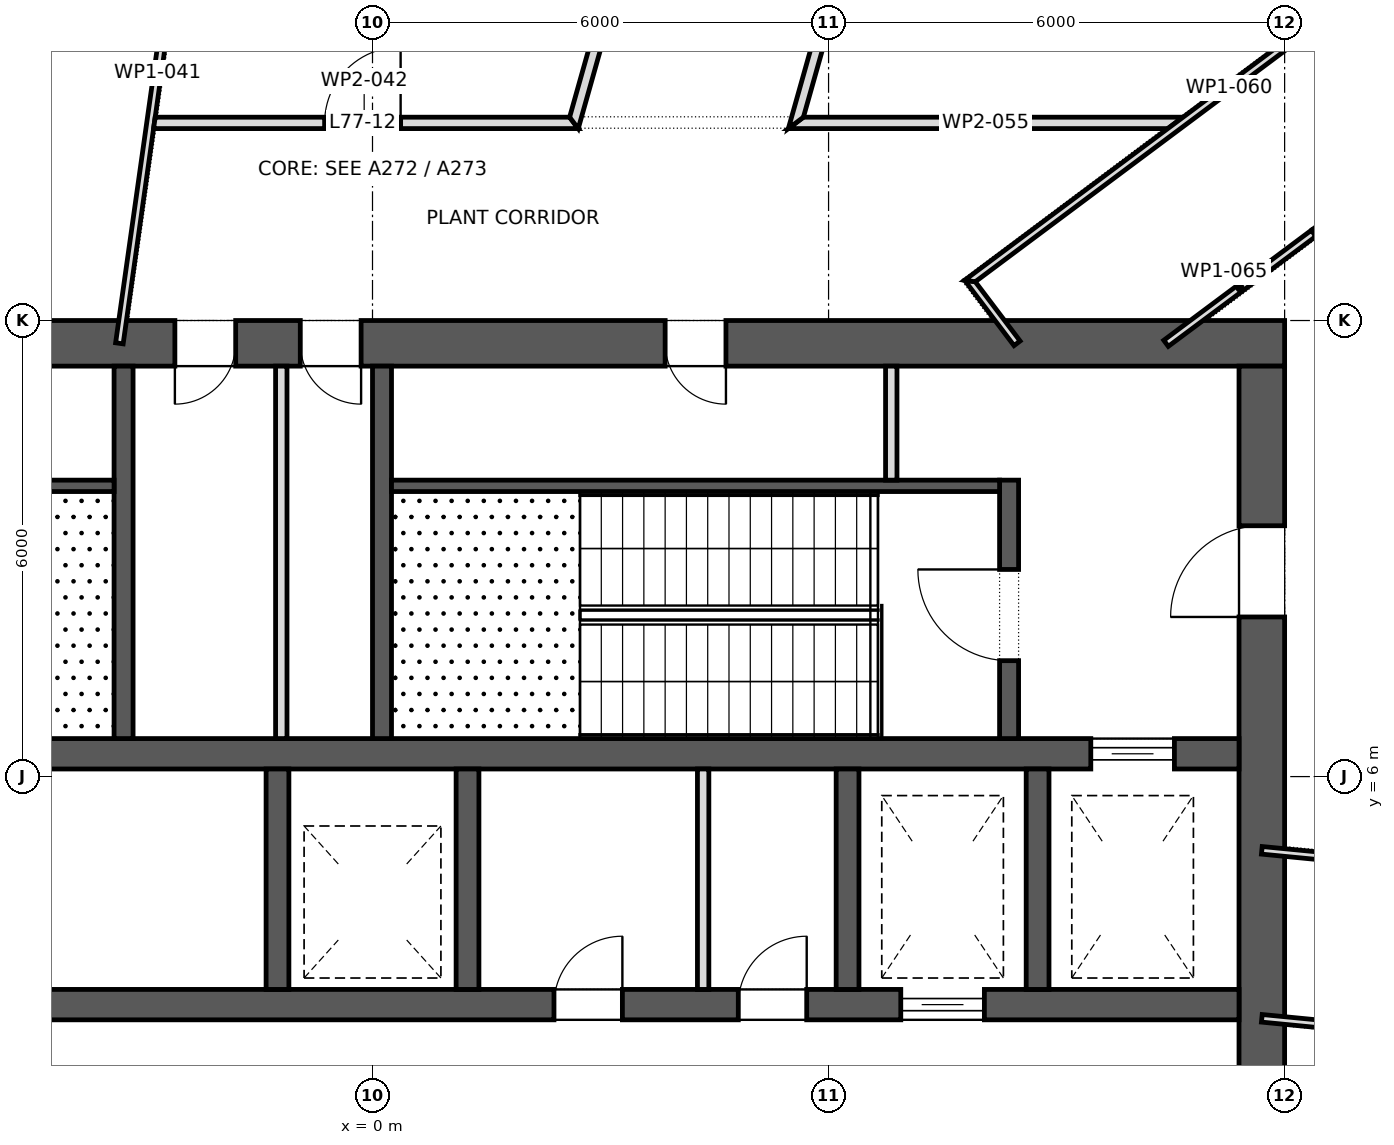
"""IFC4 building model, lengths in metres.
Left out: names, types, materials, properties, quantities, classifications, styles, units other than length and angle.
Written with IfcOpenShell. Run it as: python <this file> out.ifc"""

import sys

from ifc_helpers import new_model, si_unit, direction, frame, frame_2d, origin, place, context, subcontext, project, spatial, polyline, rectangle, outline, extrude, element, fill, save


model = new_model("IFC4")
c1 = context("Model", 3, precision=1e-05, world=origin(), true_north=direction((0.0, 1.0)))
c2 = subcontext(c1, "Body", "Model", "MODEL_VIEW")
j1 = project(units=[si_unit("LENGTHUNIT", "METRE"), si_unit("PLANEANGLEUNIT", "RADIAN")], contexts=[c1])
p1 = place(None, origin())
s1 = spatial("IfcSite", under=j1, at=p1, CompositionType="ELEMENT")
p2 = place(p1, origin())
s2 = spatial("IfcBuilding", under=s1, at=p2, CompositionType="ELEMENT")
p3 = place(p2, frame((0.0, 0.0, 328.3)))
s3 = spatial("IfcBuildingStorey", under=s2, at=p3, CompositionType="ELEMENT", Elevation=328.3)
p4 = place(p3, frame((-12.0, 11.7, 0.0), z_axis=(0.0, 0.0, 1.0), x_axis=(1.0, 0.0, 0.0)))
e1 = element("IfcWall", 1, at=p4, inside=s3, PredefinedType="SHEAR", context=c2, shape_type="SweptSolid", body=[
    extrude(rectangle(XDim=24.0, YDim=0.6, at=frame_2d((12.0, 0.0))), origin(), (0.0, 0.0, 1.0), 5.0),
])
p5 = place(p4, frame((9.4, 0.0, 0.0)))
e2 = element("IfcOpeningElement", 2, at=p5, cuts=e1, PredefinedType="OPENING", context=c2, shape_type="SweptSolid", body=[
    extrude(rectangle(XDim=0.8, YDim=2.1, at=frame_2d((0.4, 1.05))), frame((0.0, 0.312, 0.0), z_axis=(0.0, -1.0, 0.0), x_axis=(1.0, 0.0, 0.0)), (0.0, 0.0, 1.0), 0.624),
])
p6 = place(p4, frame((11.05, 0.0, 0.0)))
e3 = element("IfcOpeningElement", 3, at=p6, cuts=e1, PredefinedType="OPENING", context=c2, shape_type="SweptSolid", body=[
    extrude(rectangle(XDim=0.8, YDim=2.1, at=frame_2d((0.4, 1.05))), frame((0.0, 0.312, 0.0), z_axis=(0.0, -1.0, 0.0), x_axis=(1.0, 0.0, 0.0)), (0.0, 0.0, 1.0), 0.624),
])
p7 = place(p4, frame((4.2, 0.0, 0.0)))
e4 = element("IfcOpeningElement", 4, at=p7, cuts=e1, PredefinedType="OPENING", context=c2, shape_type="SweptSolid", body=[
    extrude(rectangle(XDim=0.8, YDim=2.1, at=frame_2d((0.4, 1.05))), frame((0.0, 0.312, 0.0), z_axis=(0.0, -1.0, 0.0), x_axis=(1.0, 0.0, 0.0)), (0.0, 0.0, 1.0), 0.624),
])
p8 = place(p4, frame((15.85, 0.0, 0.0)))
e5 = element("IfcOpeningElement", 5, at=p8, cuts=e1, PredefinedType="OPENING", context=c2, shape_type="SweptSolid", body=[
    extrude(rectangle(XDim=0.8, YDim=2.1, at=frame_2d((0.4, 1.05))), frame((0.0, 0.312, 0.0), z_axis=(0.0, -1.0, 0.0), x_axis=(1.0, 0.0, 0.0)), (0.0, 0.0, 1.0), 0.624),
])
p9 = place(p3, frame((11.7, -11.4, 0.0), z_axis=(0.0, 0.0, 1.0), x_axis=(0.0, 1.0, 0.0)))
e6 = element("IfcWall", 6, at=p9, inside=s3, PredefinedType="SHEAR", context=c2, shape_type="SweptSolid", body=[
    extrude(rectangle(XDim=22.8, YDim=0.6, at=frame_2d((11.4, 0.0))), origin(), (0.0, 0.0, 1.0), 5.0),
])
p10 = place(p9, frame((10.2, 0.0, 0.0)))
e7 = element("IfcOpeningElement", 7, at=p10, cuts=e6, PredefinedType="OPENING", context=c2, shape_type="SweptSolid", body=[
    extrude(rectangle(XDim=2.4, YDim=2.1, at=frame_2d((1.2, 1.05))), frame((0.0, 0.312, 0.0), z_axis=(0.0, -1.0, 0.0), x_axis=(1.0, 0.0, 0.0)), (0.0, 0.0, 1.0), 0.624),
])
p11 = place(p9, frame((19.5, 0.0, 0.0)))
e8 = element("IfcOpeningElement", 8, at=p11, cuts=e6, PredefinedType="OPENING", context=c2, shape_type="SweptSolid", body=[
    extrude(rectangle(XDim=1.2, YDim=2.1, at=frame_2d((0.6, 1.05))), frame((0.0, 0.312, 0.0), z_axis=(0.0, -1.0, 0.0), x_axis=(1.0, 0.0, 0.0)), (0.0, 0.0, 1.0), 0.624),
])
p12 = place(p9, frame((2.1, 0.0, 0.0)))
e9 = element("IfcOpeningElement", 9, at=p12, cuts=e6, PredefinedType="OPENING", context=c2, shape_type="SweptSolid", body=[
    extrude(rectangle(XDim=1.2, YDim=2.1, at=frame_2d((0.6, 1.05))), frame((0.0, 0.312, 0.0), z_axis=(0.0, -1.0, 0.0), x_axis=(1.0, 0.0, 0.0)), (0.0, 0.0, 1.0), 0.624),
])
p13 = place(p3, frame((-11.4, 3.0, 0.0), z_axis=(0.0, 0.0, 1.0), x_axis=(1.0, 0.0, 0.0)))
e10 = element("IfcWall", 10, at=p13, inside=s3, PredefinedType="SHEAR", context=c2, shape_type="SweptSolid", body=[
    extrude(rectangle(XDim=22.8, YDim=0.4, at=frame_2d((11.4, 0.0))), origin(), (0.0, 0.0, 1.0), 5.0),
])
p14 = place(p13, frame((18.35, 0.0, 0.0)))
e11 = element("IfcOpeningElement", 11, at=p14, cuts=e10, PredefinedType="OPENING", context=c2, shape_type="SweptSolid", body=[
    extrude(rectangle(XDim=1.1, YDim=2.1, at=frame_2d((0.55, 1.05))), frame((0.0, 0.212, 0.0), z_axis=(0.0, -1.0, 0.0), x_axis=(1.0, 0.0, 0.0)), (0.0, 0.0, 1.0), 0.424),
])
p15 = place(p13, frame((13.788, 0.0, 0.0)))
e12 = element("IfcOpeningElement", 12, at=p15, cuts=e10, PredefinedType="OPENING", context=c2, shape_type="SweptSolid", body=[
    extrude(rectangle(XDim=0.9, YDim=2.1, at=frame_2d((0.45, 1.05))), frame((0.0, 0.212, 0.0), z_axis=(0.0, -1.0, 0.0), x_axis=(1.0, 0.0, 0.0)), (0.0, 0.0, 1.0), 0.424),
])
p16 = place(p13, frame((16.212, 0.0, 0.0)))
e13 = element("IfcOpeningElement", 13, at=p16, cuts=e10, PredefinedType="OPENING", context=c2, shape_type="SweptSolid", body=[
    extrude(rectangle(XDim=0.9, YDim=2.1, at=frame_2d((0.45, 1.05))), frame((0.0, 0.212, 0.0), z_axis=(0.0, -1.0, 0.0), x_axis=(1.0, 0.0, 0.0)), (0.0, 0.0, 1.0), 0.424),
])
p17 = place(p13, frame((5.95, 0.0, 0.0)))
e14 = element("IfcOpeningElement", 14, at=p17, cuts=e10, PredefinedType="OPENING", context=c2, shape_type="SweptSolid", body=[
    extrude(rectangle(XDim=0.9, YDim=2.1, at=frame_2d((0.45, 1.05))), frame((0.0, 0.212, 0.0), z_axis=(0.0, -1.0, 0.0), x_axis=(1.0, 0.0, 0.0)), (0.0, 0.0, 1.0), 0.424),
])
p18 = place(p3, frame((-11.4, 6.3, 0.0), z_axis=(0.0, 0.0, 1.0), x_axis=(1.0, 0.0, 0.0)))
e15 = element("IfcWall", 15, at=p18, inside=s3, PredefinedType="SHEAR", context=c2, shape_type="SweptSolid", body=[
    extrude(rectangle(XDim=22.8, YDim=0.4, at=frame_2d((11.4, 0.0))), origin(), (0.0, 0.0, 1.0), 5.0),
])
p19 = place(p18, frame((20.85, 0.0, 0.0)))
e16 = element("IfcOpeningElement", 16, at=p19, cuts=e15, PredefinedType="OPENING", context=c2, shape_type="SweptSolid", body=[
    extrude(rectangle(XDim=1.1, YDim=2.1, at=frame_2d((0.55, 1.05))), frame((0.0, 0.212, 0.0), z_axis=(0.0, -1.0, 0.0), x_axis=(1.0, 0.0, 0.0)), (0.0, 0.0, 1.0), 0.424),
])
for number, where, z_axis, x_axis in (
    (17, (-1.25, 3.2, 0.0), (0.0, 0.0, 1.0), (0.0, 1.0, 0.0)),
    (18, (1.25, 3.2, 0.0), (0.0, 0.0, 1.0), (0.0, 1.0, 0.0)),
    (19, (6.25, 3.2, 0.0), (0.0, 0.0, 1.0), (0.0, 1.0, 0.0)),
    (20, (8.75, 3.2, 0.0), (0.0, 0.0, 1.0), (0.0, 1.0, 0.0)),
):
    element("IfcWall", number, at=place(p3, frame(where, z_axis=z_axis, x_axis=x_axis)), inside=s3, PredefinedType="SHEAR", context=c2, shape_type="SweptSolid", body=[
        extrude(rectangle(XDim=2.9, YDim=0.3, at=frame_2d((1.45, 0.0))), origin(), (0.0, 0.0, 1.0), 5.0),
    ])
for number, where, z_axis, x_axis in (
    (21, (-3.275, 6.5, 0.0), (0.0, 0.0, 1.0), (0.0, 1.0, 0.0)),
    (22, (0.125, 6.5, 0.0), (0.0, 0.0, 1.0), (0.0, 1.0, 0.0)),
):
    element("IfcWall", number, at=place(p3, frame(where, z_axis=z_axis, x_axis=x_axis)), inside=s3, PredefinedType="SHEAR", context=c2, shape_type="SweptSolid", body=[
        extrude(rectangle(XDim=4.9, YDim=0.25, at=frame_2d((2.45, 0.0))), origin(), (0.0, 0.0, 1.0), 4.65),
    ])
p20 = place(p3, frame((8.375, 6.5, 0.0), z_axis=(0.0, 0.0, 1.0), x_axis=(0.0, 1.0, 0.0)))
e23 = element("IfcWall", 23, at=p20, inside=s3, PredefinedType="SHEAR", context=c2, shape_type="SweptSolid", body=[
    extrude(rectangle(XDim=3.4, YDim=0.25, at=frame_2d((1.7, 0.0))), origin(), (0.0, 0.0, 1.0), 4.65),
])
p21 = place(p20, frame((1.025, 0.0, 0.0)))
e24 = element("IfcOpeningElement", 24, at=p21, cuts=e23, PredefinedType="OPENING", context=c2, shape_type="SweptSolid", body=[
    extrude(rectangle(XDim=1.2, YDim=2.1, at=frame_2d((0.6, 1.05))), frame((0.0, 0.137, 0.0), z_axis=(0.0, -1.0, 0.0), x_axis=(1.0, 0.0, 0.0)), (0.0, 0.0, 1.0), 0.274),
])
for number, where, z_axis, x_axis in (
    (25, (-11.4, 9.825, 0.0), (0.0, 0.0, 1.0), (1.0, 0.0, 0.0)),
    (26, (0.25, 9.825, 0.0), (0.0, 0.0, 1.0), (1.0, 0.0, 0.0)),
):
    element("IfcWall", number, at=place(p3, frame(where, z_axis=z_axis, x_axis=x_axis)), inside=s3, PredefinedType="SHEAR", context=c2, shape_type="SweptSolid", body=[
        extrude(rectangle(XDim=8.0, YDim=0.15, at=frame_2d((4.0, 0.0))), origin(), (0.0, 0.0, 1.0), 4.65),
    ])
p22 = place(p3, frame((-1.2, 6.5, 0.0), z_axis=(0.0, 0.0, 1.0), x_axis=(0.0, 1.0, 0.0)))
e27 = element("IfcWall", 27, at=p22, inside=s3, PredefinedType="PARTITIONING", context=c2, shape_type="SweptSolid", body=[
    extrude(rectangle(XDim=4.9, YDim=0.15, at=frame_2d((2.45, 0.0))), origin(), (0.0, 0.0, 1.0), 4.65),
])
p23 = place(p3, frame((6.825, 9.9, 0.0), z_axis=(0.0, 0.0, 1.0), x_axis=(0.0, 1.0, 0.0)))
e28 = element("IfcWall", 28, at=p23, inside=s3, PredefinedType="PARTITIONING", context=c2, shape_type="SweptSolid", body=[
    extrude(rectangle(XDim=1.5, YDim=0.15, at=frame_2d((0.75, 0.0))), origin(), (0.0, 0.0, 1.0), 4.65),
])
p24 = place(p3, frame((4.35, 3.2, 0.0), z_axis=(0.0, 0.0, 1.0), x_axis=(0.0, 1.0, 0.0)))
e29 = element("IfcWall", 29, at=p24, inside=s3, PredefinedType="PARTITIONING", context=c2, shape_type="SweptSolid", body=[
    extrude(rectangle(XDim=2.9, YDim=0.15, at=frame_2d((1.45, 0.0))), origin(), (0.0, 0.0, 1.0), 4.65),
])
p25 = place(p3, frame((-5.55, 11.7, 0.0), z_axis=(0.0, 0.0, 1.0), x_axis=(0.138844805467, 0.990314152173, 0.0)))
e30 = element("IfcWall", 30, at=p25, inside=s3, PredefinedType="PARTITIONING", context=c2, shape_type="SweptSolid", body=[
    extrude(rectangle(XDim=9.726, YDim=0.1, at=frame_2d((4.863, 0.0))), origin(), (0.0, 0.0, 1.0), 4.65),
])
p26 = place(p3, frame((-3.33, 11.7, 0.0), z_axis=(0.0, 0.0, 1.0), x_axis=(0.140005886866, 0.990150671182, 0.0)))
e31 = element("IfcWall", 31, at=p26, inside=s3, PredefinedType="PARTITIONING", context=c2, shape_type="SweptSolid", body=[
    extrude(rectangle(XDim=7.197, YDim=0.1, at=frame_2d((3.598, 0.0))), origin(), (0.0, 0.0, 1.0), 4.65),
])
p27 = place(p3, frame((-2.88, 14.6, 0.0), z_axis=(0.0, 0.0, 1.0), x_axis=(1.0, 0.0, 0.0)))
e32 = element("IfcWall", 32, at=p27, inside=s3, PredefinedType="PARTITIONING", context=c2, shape_type="SweptSolid", body=[
    extrude(outline(polyline([(0.0, -0.075), (1.862, -0.075), (3.724, -0.075), (5.587, -0.075), (5.53, 0.0), (5.473, 0.075), (5.473, 0.075), (5.473, 0.075), (3.656, 0.075), (1.838, 0.075), (0.021, 0.075), (0.0, -0.073), (0.0, -0.075)])), origin(), (0.0, 0.0, 1.0), 4.65),
])
p28 = place(p27, frame((2.25, 0.0, 0.0)))
e33 = element("IfcOpeningElement", 33, at=p28, cuts=e32, PredefinedType="OPENING", context=c2, shape_type="SweptSolid", body=[
    extrude(rectangle(XDim=1.0, YDim=2.1, at=frame_2d((0.5, 1.05))), frame((0.0, 0.087, 0.0), z_axis=(0.0, -1.0, 0.0), x_axis=(1.0, 0.0, 0.0)), (0.0, 0.0, 1.0), 0.174),
])
p29 = place(p3, frame((2.635, 14.545, 0.0), z_axis=(0.0, 0.0, 1.0), x_axis=(0.271290420786, 0.962497536407, 0.0)))
e34 = element("IfcWall", 34, at=p29, inside=s3, PredefinedType="PARTITIONING", context=c2, shape_type="SweptSolid", body=[
    extrude(outline(polyline([(0.0, -0.075), (1.768, -0.075), (3.536, -0.075), (5.304, -0.075), (7.072, -0.075), (6.905, 0.075), (5.207, 0.075), (3.509, 0.075), (1.812, 0.075), (0.114, 0.075), (0.0, -0.075)])), origin(), (0.0, 0.0, 1.0), 4.65),
])
p30 = place(p3, frame((5.471, 14.6, 0.0), z_axis=(0.0, 0.0, 1.0), x_axis=(1.0, 0.0, 0.0)))
e35 = element("IfcWall", 35, at=p30, inside=s3, PredefinedType="PARTITIONING", context=c2, shape_type="SweptSolid", body=[
    extrude(outline(polyline([(0.0, -0.075), (1.664, -0.075), (3.328, -0.075), (4.992, -0.075), (5.193, 0.075), (5.193, 0.075), (3.528, 0.075), (1.863, 0.075), (0.198, 0.075), (0.198, 0.075), (0.198, 0.075), (0.099, 0.0), (0.0, -0.075)])), origin(), (0.0, 0.0, 1.0), 4.65),
])
p31 = place(p3, frame((7.83, 12.56, 0.0), z_axis=(0.0, 0.0, 1.0), x_axis=(0.603146922662, -0.79763010831, 0.0)))
e36 = element("IfcWall", 36, at=p31, inside=s3, PredefinedType="PARTITIONING", context=c2, shape_type="SweptSolid", body=[
    extrude(outline(polyline([(1.078, 0.05), (0.101, 0.05), (0.0, -0.05), (0.0, -0.05), (1.078, -0.05), (1.078, 0.05)])), origin(), (0.0, 0.0, 1.0), 4.65),
])
p32 = place(p3, frame((7.82, 12.49, 0.0), z_axis=(0.0, 0.0, 1.0), x_axis=(0.801408213351, 0.598117777343, 0.0)))
e37 = element("IfcWall", 37, at=p32, inside=s3, PredefinedType="PARTITIONING", context=c2, shape_type="SweptSolid", body=[
    extrude(outline(polyline([(0.0, 0.05), (0.0, 0.05), (0.101, -0.05), (1.792, -0.05), (3.483, -0.05), (5.175, -0.05), (6.866, -0.05), (8.558, -0.05), (8.558, 0.05), (6.846, 0.05), (5.135, 0.05), (3.423, 0.05), (1.712, 0.05), (0.0, 0.05)])), origin(), (0.0, 0.0, 1.0), 4.65),
])
p33 = place(p3, frame((10.44, 11.7, 0.0), z_axis=(0.0, 0.0, 1.0), x_axis=(0.801719620775, 0.597700300873, 0.0)))
e38 = element("IfcWall", 38, at=p33, inside=s3, PredefinedType="PARTITIONING", context=c2, shape_type="SweptSolid", body=[
    extrude(outline(polyline([(0.0, 0.05), (0.0, -0.05), (2.432, -0.05), (2.432, 0.05), (0.0, 0.05)])), origin(), (0.0, 0.0, 1.0), 4.65),
])
p34 = place(p3, frame((11.7, 2.82, 0.0), z_axis=(0.0, 0.0, 1.0), x_axis=(0.995286657009, -0.096976648632, 0.0)))
e39 = element("IfcWall", 39, at=p34, inside=s3, PredefinedType="PARTITIONING", context=c2, shape_type="SweptSolid", body=[
    extrude(outline(polyline([(0.0, -0.05), (1.497, -0.05), (2.993, -0.05), (2.994, -0.05), (2.994, -0.05), (4.518, -0.05), (6.041, -0.05), (7.565, -0.05), (9.088, -0.05), (9.088, 0.05), (7.271, 0.05), (5.453, 0.05), (3.635, 0.05), (1.818, 0.05), (0.0, 0.05), (0.0, -0.05)])), origin(), (0.0, 0.0, 1.0), 4.65),
])
p35 = place(p3, frame((11.7, 5.03, 0.0), z_axis=(0.0, 0.0, 1.0), x_axis=(0.995314737099, -0.096688024663, 0.0)))
e40 = element("IfcWall", 40, at=p35, inside=s3, PredefinedType="PARTITIONING", context=c2, shape_type="SweptSolid", body=[
    extrude(outline(polyline([(13.617, -0.05), (13.617, -0.048), (13.607, -0.016), (13.583, -0.024), (13.558, 0.05), (11.772, 0.05), (9.986, 0.05), (8.2, 0.05), (6.414, 0.05), (4.628, 0.05), (2.843, 0.05), (2.833, 0.049), (2.833, 0.05), (1.417, 0.05), (0.0, 0.05), (0.0, -0.05), (1.945, -0.05), (3.891, -0.05), (5.836, -0.05), (7.781, -0.05), (9.727, -0.05), (11.672, -0.05), (13.617, -0.05)])), origin(), (0.0, 0.0, 1.0), 4.65),
])
p36 = place(p3, frame((6.228, 16.93, 0.0), z_axis=(0.0, 0.0, 1.0), x_axis=(-0.271623518644, -0.962403586922, 0.0)))
e41 = element("IfcWall", 41, at=p36, inside=s3, PredefinedType="PARTITIONING", context=c2, shape_type="SweptSolid", body=[
    extrude(outline(polyline([(0.0, -0.075), (1.26, -0.075), (2.52, -0.075), (2.322, 0.075), (0.0, 0.075), (0.0, -0.075)])), origin(), (0.0, 0.0, 1.0), 4.65),
])
p37 = place(p3, frame((12.389, 13.153, 0.0), z_axis=(0.0, 0.0, 1.0), x_axis=(0.801690929697, 0.597738783451, 0.0)))
e42 = element("IfcWall", 42, at=p37, inside=s3, PredefinedType="PARTITIONING", context=c2, shape_type="SweptSolid", body=[
    extrude(outline(polyline([(0.0, 0.05), (0.0, -0.05), (1.781, -0.05), (1.781, 0.05), (0.0, 0.05)])), origin(), (0.0, 0.0, 1.0), 4.2),
])
p38 = place(p19, origin())
e43 = element("IfcDoor", 43, at=p38, inside=s3, OperationType="SLIDING_TO_LEFT", PredefinedType="DOOR", context=c2, shape_type="SweptSolid", body=[
    extrude(rectangle(XDim=1.1, YDim=2.1, at=frame_2d((0.55, 1.05))), frame((0.0, 0.025, 0.0), z_axis=(0.0, -1.0, 0.0), x_axis=(1.0, 0.0, 0.0)), (0.0, 0.0, 1.0), 0.05),
])
fill(e16, e43)
p39 = place(p14, origin())
e44 = element("IfcDoor", 44, at=p39, inside=s3, OperationType="SLIDING_TO_LEFT", PredefinedType="DOOR", context=c2, shape_type="SweptSolid", body=[
    extrude(rectangle(XDim=1.1, YDim=2.1, at=frame_2d((0.55, 1.05))), frame((0.0, 0.025, 0.0), z_axis=(0.0, -1.0, 0.0), x_axis=(1.0, 0.0, 0.0)), (0.0, 0.0, 1.0), 0.05),
])
fill(e11, e44)
p40 = place(p21, origin())
e45 = element("IfcDoor", 45, at=p40, inside=s3, OperationType="SINGLE_SWING_LEFT", PredefinedType="DOOR", context=c2, shape_type="SweptSolid", body=[
    extrude(rectangle(XDim=1.2, YDim=2.1, at=frame_2d((0.6, 1.05))), frame((0.0, 0.025, 0.0), z_axis=(0.0, -1.0, 0.0), x_axis=(1.0, 0.0, 0.0)), (0.0, 0.0, 1.0), 0.05),
])
fill(e24, e45)
p41 = place(p11, origin())
e46 = element("IfcDoor", 46, at=p41, inside=s3, OperationType="SINGLE_SWING_RIGHT", PredefinedType="DOOR", context=c2, shape_type="SweptSolid", body=[
    extrude(rectangle(XDim=1.2, YDim=2.1, at=frame_2d((0.6, 1.05))), frame((0.0, 0.025, 0.0), z_axis=(0.0, -1.0, 0.0), x_axis=(1.0, 0.0, 0.0)), (0.0, 0.0, 1.0), 0.05),
])
fill(e8, e46)
p42 = place(p5, frame((0.8, 0.0, 0.0), z_axis=(0.0, 0.0, 1.0), x_axis=(-1.0, 0.0, 0.0)))
e47 = element("IfcDoor", 47, at=p42, inside=s3, OperationType="SINGLE_SWING_LEFT", PredefinedType="DOOR", context=c2, shape_type="SweptSolid", body=[
    extrude(rectangle(XDim=0.8, YDim=2.1, at=frame_2d((0.4, 1.05))), frame((0.0, 0.025, 0.0), z_axis=(0.0, -1.0, 0.0), x_axis=(1.0, 0.0, 0.0)), (0.0, 0.0, 1.0), 0.05),
])
fill(e2, e47)
p43 = place(p6, frame((0.8, 0.0, 0.0), z_axis=(0.0, 0.0, 1.0), x_axis=(-1.0, 0.0, 0.0)))
e48 = element("IfcDoor", 48, at=p43, inside=s3, OperationType="SINGLE_SWING_RIGHT", PredefinedType="DOOR", context=c2, shape_type="SweptSolid", body=[
    extrude(rectangle(XDim=0.8, YDim=2.1, at=frame_2d((0.4, 1.05))), frame((0.0, 0.025, 0.0), z_axis=(0.0, -1.0, 0.0), x_axis=(1.0, 0.0, 0.0)), (0.0, 0.0, 1.0), 0.05),
])
fill(e3, e48)
p44 = place(p8, frame((0.8, 0.0, 0.0), z_axis=(0.0, 0.0, 1.0), x_axis=(-1.0, 0.0, 0.0)))
e49 = element("IfcDoor", 49, at=p44, inside=s3, OperationType="SINGLE_SWING_RIGHT", PredefinedType="DOOR", context=c2, shape_type="SweptSolid", body=[
    extrude(rectangle(XDim=0.8, YDim=2.1, at=frame_2d((0.4, 1.05))), frame((0.0, 0.025, 0.0), z_axis=(0.0, -1.0, 0.0), x_axis=(1.0, 0.0, 0.0)), (0.0, 0.0, 1.0), 0.05),
])
fill(e5, e49)
p45 = place(p15, origin())
e50 = element("IfcDoor", 50, at=p45, inside=s3, OperationType="SINGLE_SWING_LEFT", PredefinedType="DOOR", context=c2, shape_type="SweptSolid", body=[
    extrude(rectangle(XDim=0.9, YDim=2.1, at=frame_2d((0.45, 1.05))), frame((0.0, 0.025, 0.0), z_axis=(0.0, -1.0, 0.0), x_axis=(1.0, 0.0, 0.0)), (0.0, 0.0, 1.0), 0.05),
])
fill(e12, e50)
p46 = place(p16, origin())
e51 = element("IfcDoor", 51, at=p46, inside=s3, OperationType="SINGLE_SWING_LEFT", PredefinedType="DOOR", context=c2, shape_type="SweptSolid", body=[
    extrude(rectangle(XDim=0.9, YDim=2.1, at=frame_2d((0.45, 1.05))), frame((0.0, 0.025, 0.0), z_axis=(0.0, -1.0, 0.0), x_axis=(1.0, 0.0, 0.0)), (0.0, 0.0, 1.0), 0.05),
])
fill(e13, e51)
p47 = place(p28, origin())
e52 = element("IfcDoor", 52, at=p47, inside=s3, OperationType="SINGLE_SWING_LEFT", PredefinedType="DOOR", context=c2, shape_type="SweptSolid", body=[
    extrude(rectangle(XDim=1.0, YDim=2.1, at=frame_2d((0.5, 1.05))), frame((0.0, 0.025, 0.0), z_axis=(0.0, -1.0, 0.0), x_axis=(1.0, 0.0, 0.0)), (0.0, 0.0, 1.0), 0.05),
])
fill(e33, e52)
save(model, sys.argv[1])
